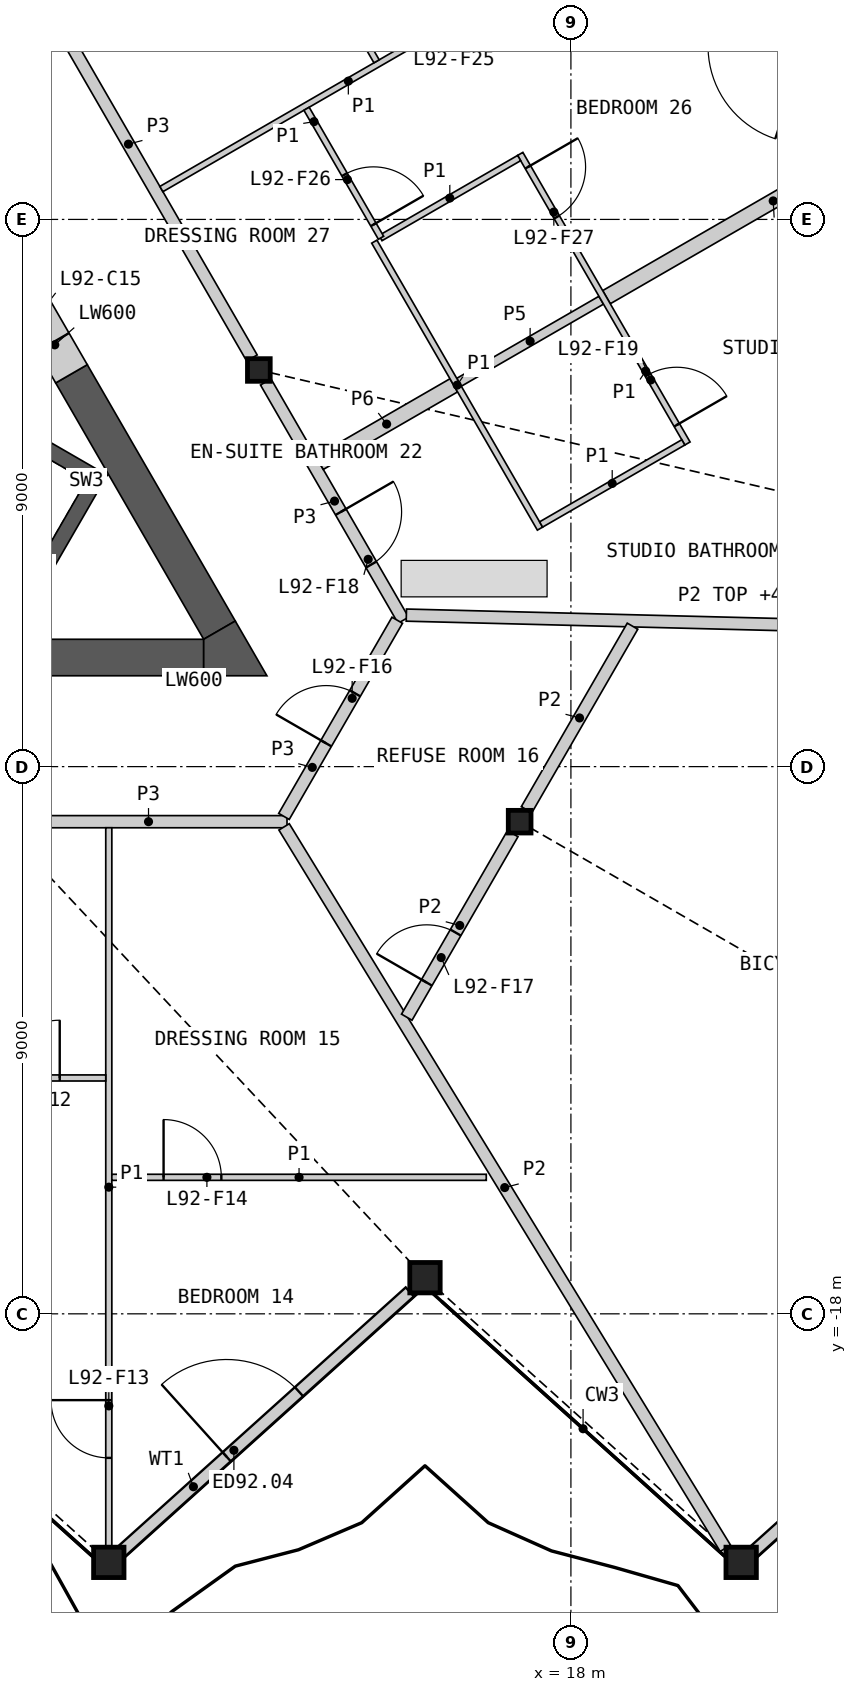
"""IFC4 building model, lengths in metres.
Left out: names, types, materials, properties, quantities, classifications, styles, units other than length and angle.
Written with IfcOpenShell. Run it as: python <this file> out.ifc"""

import sys

from ifc_helpers import new_model, si_unit, direction, frame, frame_2d, origin, origin_2d, place, context, subcontext, project, spatial, polyline, rectangle, hollow_rectangle, i_section, outline, extrude, element, fill, save


model = new_model("IFC4")
c1 = context("Model", 3, precision=1e-05, world=origin(), true_north=direction((0.0, 1.0)))
c2 = subcontext(c1, "Body", "Model", "MODEL_VIEW")
j1 = project(units=[si_unit("LENGTHUNIT", "METRE"), si_unit("PLANEANGLEUNIT", "RADIAN")], contexts=[c1])
p1 = place(None, origin())
s1 = spatial("IfcSite", under=j1, at=p1, CompositionType="ELEMENT")
p2 = place(p1, origin())
s2 = spatial("IfcBuilding", under=s1, at=p2, CompositionType="ELEMENT")
p3 = place(p2, frame((0.0, 0.0, 401.8)))
s3 = spatial("IfcBuildingStorey", under=s2, at=p3, CompositionType="ELEMENT", Elevation=401.8)
for number, where, z_axis, x_axis in (
    (1, (10.4, -22.088, 0.0), (0.0, 0.0, 1.0), (1.0, 0.0, 0.0)),
    (2, (15.6, -17.406, 0.0), (0.0, 0.0, 1.0), (1.0, 0.0, 0.0)),
    (3, (20.8, -22.088, 0.0), (0.0, 0.0, 1.0), (1.0, 0.0, 0.0)),
):
    element("IfcColumn", number, at=place(p3, frame(where, z_axis=z_axis, x_axis=x_axis)), inside=s3, PredefinedType="COLUMN", context=c2, shape_type="SweptSolid", body=[
        extrude(hollow_rectangle(XDim=0.5, YDim=0.5, WallThickness=0.03, at=origin_2d()), origin(), (0.0, 0.0, 1.0), 3.4),
    ])
for number, where, z_axis, x_axis in (
    (4, (17.157, -9.906, 0.0), (0.0, 0.0, 1.0), (1.0, 0.0, 0.0)),
    (5, (12.868, -2.476, 0.0), (0.0, 0.0, 1.0), (1.0, 0.0, 0.0)),
):
    element("IfcColumn", number, at=place(p3, frame(where, z_axis=z_axis, x_axis=x_axis)), inside=s3, PredefinedType="COLUMN", context=c2, shape_type="SweptSolid", body=[
        extrude(i_section(OverallWidth=0.374, OverallDepth=0.372, WebThickness=0.016, FlangeThickness=0.026, at=origin_2d()), origin(), (0.0, 0.0, 1.0), 3.4),
    ])
p4 = place(p3, frame((10.605, -21.912, 0.0), z_axis=(0.0, 0.0, 1.0), x_axis=(0.743149635876, 0.669125263831, 0.0)))
e6 = element("IfcWall", 6, at=p4, inside=s3, PredefinedType="SOLIDWALL", context=c2, shape_type="SweptSolid", body=[
    extrude(rectangle(XDim=6.385, YDim=0.2, at=frame_2d((3.193, 0.0))), origin(), (0.0, 0.0, 1.0), 2.634),
])
p5 = place(p4, frame((2.333, 0.0, 0.0)))
e7 = element("IfcOpeningElement", 7, at=p5, cuts=e6, PredefinedType="OPENING", context=c2, shape_type="SweptSolid", body=[
    extrude(rectangle(XDim=1.6, YDim=2.25, at=frame_2d((0.8, 1.125))), frame((0.0, 0.11, 0.0), z_axis=(0.0, -1.0, 0.0), x_axis=(1.0, 0.0, 0.0)), (0.0, 0.0, 1.0), 0.22),
])
p6 = place(p3, frame((21.005, -21.912, 0.0), z_axis=(0.0, 0.0, 1.0), x_axis=(0.743132515916, 0.669144277259, 0.0)))
e8 = element("IfcWall", 8, at=p6, inside=s3, PredefinedType="SOLIDWALL", context=c2, shape_type="SweptSolid", body=[
    extrude(rectangle(XDim=6.385, YDim=0.2, at=frame_2d((3.192, 0.0))), origin(), (0.0, 0.0, 1.0), 2.634),
])
p7 = place(p6, frame((2.333, 0.0, 0.0)))
e9 = element("IfcOpeningElement", 9, at=p7, cuts=e8, PredefinedType="OPENING", context=c2, shape_type="SweptSolid", body=[
    extrude(rectangle(XDim=1.6, YDim=2.25, at=frame_2d((0.8, 1.125))), frame((0.0, 0.11, 0.0), z_axis=(0.0, -1.0, 0.0), x_axis=(1.0, 0.0, 0.0)), (0.0, 0.0, 1.0), 0.22),
])
p8 = place(p3, frame((24.074, 2.127, 0.0), z_axis=(0.0, 0.0, 1.0), x_axis=(-0.951055516513, 0.309020071371, 0.0)))
e10 = element("IfcWall", 10, at=p8, inside=s3, PredefinedType="SOLIDWALL", context=c2, shape_type="SweptSolid", body=[
    extrude(rectangle(XDim=6.44, YDim=0.2, at=frame_2d((3.22, 0.0))), origin(), (0.0, 0.0, 1.0), 2.634),
])
p9 = place(p8, frame((2.333, 0.0, 0.0)))
e11 = element("IfcOpeningElement", 11, at=p9, cuts=e10, PredefinedType="OPENING", context=c2, shape_type="SweptSolid", body=[
    extrude(rectangle(XDim=1.6, YDim=2.25, at=frame_2d((0.8, 1.125))), frame((0.0, 0.11, 0.0), z_axis=(0.0, -1.0, 0.0), x_axis=(1.0, 0.0, 0.0)), (0.0, 0.0, 1.0), 0.22),
])
p10 = place(p3, origin())
e12 = element("IfcWall", 12, at=p10, inside=s3, PredefinedType="SHEAR", context=c2, shape_type="SweptSolid", body=[
    extrude(outline(polyline([(8.83, -6.881), (10.374, -4.206), (10.032, -4.298), (8.738, -6.539), (8.83, -6.881)])), origin(), (0.0, 0.0, 1.0), 3.1),
])
p11 = place(p3, origin())
e13 = element("IfcWall", 13, at=p11, inside=s3, PredefinedType="SHEAR", context=c2, shape_type="SweptSolid", body=[
    extrude(outline(polyline([(10.032, -4.298), (10.374, -4.206), (5.307, -1.281), (5.182, -1.498), (10.032, -4.298)])), origin(), (0.0, 0.0, 1.0), 3.1),
])
p12 = place(p3, frame((-4.892, -7.206, 0.0), z_axis=(0.0, 0.0, 1.0), x_axis=(1.0, 0.0, 0.0)))
e14 = element("IfcWall", 14, at=p12, inside=s3, PredefinedType="SHEAR", context=c2, shape_type="SweptSolid", body=[
    extrude(rectangle(XDim=16.853, YDim=0.6, at=frame_2d((8.426, 0.0))), origin(), (0.0, 0.0, 1.0), 3.1),
])
p13 = place(p3, frame((12.221, -6.756, 0.0), z_axis=(0.0, 0.0, 1.0), x_axis=(-0.50000604952, 0.866021911064, 0.0)))
e15 = element("IfcWall", 15, at=p13, inside=s3, PredefinedType="SHEAR", context=c2, shape_type="SweptSolid", body=[
    extrude(rectangle(XDim=4.869, YDim=0.6, at=frame_2d((2.434, 0.0))), origin(), (0.0, 0.0, 1.0), 3.1),
])
p14 = place(p3, origin())
e16 = element("IfcWall", 16, at=p14, inside=s3, PredefinedType="SHEAR", context=c2, shape_type="SweptSolid", body=[
    extrude(outline(polyline([(11.961, -7.506), (11.961, -6.906), (12.48, -6.606), (13.0, -7.506), (11.961, -7.506)])), origin(), (0.0, 0.0, 1.0), 3.1),
])
p15 = place(p3, frame((9.786, -2.539, 0.0), z_axis=(0.0, 0.0, 1.0), x_axis=(-0.499981787252, 0.866035918664, 0.0)))
e17 = element("IfcWall", 17, at=p15, inside=s3, PredefinedType="SHEAR", context=c2, shape_type="SweptSolid", body=[
    extrude(rectangle(XDim=2.2, YDim=0.6, at=frame_2d((1.1, 0.0))), origin(), (0.0, 0.0, 1.0), 3.1),
])
p16 = place(p15, frame((0.6, 0.0, 0.0)))
e18 = element("IfcOpeningElement", 18, at=p16, cuts=e17, PredefinedType="OPENING", context=c2, shape_type="SweptSolid", body=[
    extrude(rectangle(XDim=1.0, YDim=2.1, at=frame_2d((0.5, 1.05))), frame((0.0, 0.31, 0.0), z_axis=(0.0, -1.0, 0.0), x_axis=(1.0, 0.0, 0.0)), (0.0, 0.0, 1.0), 0.62),
])
p17 = place(p3, frame((8.692, 4.756, 0.0), z_axis=(0.0, 0.0, 1.0), x_axis=(0.500001682468, -0.866024432409, 0.0)))
e19 = element("IfcWall", 19, at=p17, inside=s3, PredefinedType="PARTITIONING", context=c2, shape_type="SweptSolid", body=[
    extrude(rectangle(XDim=8.124, YDim=0.2, at=frame_2d((4.062, 0.0))), origin(), (0.0, 0.0, 1.0), 3.1),
])
p18 = place(p3, frame((18.585, -1.279, 0.0), z_axis=(0.0, 0.0, 1.0), x_axis=(0.866023139795, 0.500003921324, 0.0)))
e20 = element("IfcWall", 20, at=p18, inside=s3, PredefinedType="PARTITIONING", context=c2, shape_type="SweptSolid", body=[
    extrude(rectangle(XDim=6.332, YDim=0.25, at=frame_2d((3.166, 0.0))), origin(), (0.0, 0.0, 1.0), 2.33),
])
p19 = place(p3, frame((8.775, -9.906, 0.0), z_axis=(0.0, 0.0, 1.0), x_axis=(1.0, 0.0, 0.0)))
e21 = element("IfcWall", 21, at=p19, inside=s3, PredefinedType="PARTITIONING", context=c2, shape_type="SweptSolid", body=[
    extrude(rectangle(XDim=4.555, YDim=0.2, at=frame_2d((2.278, 0.0))), origin(), (0.0, 0.0, 1.0), 3.1),
])
p20 = place(p3, frame((12.981, -2.673, 0.0), z_axis=(0.0, 0.0, 1.0), x_axis=(0.499974648164, -0.866040040179, 0.0)))
e22 = element("IfcWall", 22, at=p20, inside=s3, PredefinedType="PARTITIONING", context=c2, shape_type="SweptSolid", body=[
    extrude(rectangle(XDim=4.525, YDim=0.2, at=frame_2d((2.263, 0.0))), origin(), (0.0, 0.0, 1.0), 3.1),
])
p21 = place(p20, frame((2.468, 0.0, 0.0)))
e23 = element("IfcOpeningElement", 23, at=p21, cuts=e22, PredefinedType="OPENING", context=c2, shape_type="SweptSolid", body=[
    extrude(rectangle(XDim=1.0, YDim=2.1, at=frame_2d((0.5, 1.05))), frame((0.0, 0.11, 0.0), z_axis=(0.0, -1.0, 0.0), x_axis=(1.0, 0.0, 0.0)), (0.0, 0.0, 1.0), 0.22),
])
p22 = place(p3, frame((13.281, -9.819, 0.0), z_axis=(0.0, 0.0, 1.0), x_axis=(0.499958791762, 0.866049194065, 0.0)))
e24 = element("IfcWall", 24, at=p22, inside=s3, PredefinedType="PARTITIONING", context=c2, shape_type="SweptSolid", body=[
    extrude(rectangle(XDim=3.726, YDim=0.2, at=frame_2d((1.863, 0.0))), origin(), (0.0, 0.0, 1.0), 3.1),
])
p23 = place(p22, frame((1.388, 0.0, 0.0)))
e25 = element("IfcOpeningElement", 25, at=p23, cuts=e24, PredefinedType="OPENING", context=c2, shape_type="SweptSolid", body=[
    extrude(rectangle(XDim=0.95, YDim=2.1, at=frame_2d((0.475, 1.05))), frame((0.0, 0.11, 0.0), z_axis=(0.0, -1.0, 0.0), x_axis=(1.0, 0.0, 0.0)), (0.0, 0.0, 1.0), 0.22),
])
p24 = place(p3, frame((13.865, -4.004, 0.0), z_axis=(0.0, 0.0, 1.0), x_axis=(0.866054858364, 0.499948979701, 0.0)))
e26 = element("IfcWall", 26, at=p24, inside=s3, PredefinedType="PARTITIONING", context=c2, shape_type="SweptSolid", body=[
    extrude(rectangle(XDim=2.55, YDim=0.25, at=frame_2d((1.275, 0.0))), origin(), (0.0, 0.0, 1.0), 2.33),
])
p25 = place(p3, frame((15.294, -6.508, 0.0), z_axis=(0.0, 0.0, 1.0), x_axis=(0.999679467074, -0.02531724927, 0.0)))
e27 = element("IfcWall", 27, at=p25, inside=s3, PredefinedType="PARTITIONING", context=c2, shape_type="SweptSolid", body=[
    extrude(rectangle(XDim=13.53, YDim=0.2, at=frame_2d((6.765, 0.0))), origin(), (0.0, 0.0, 1.0), 2.33),
])
p26 = place(p3, frame((13.283, -9.991, 0.0), z_axis=(0.0, 0.0, 1.0), x_axis=(0.521777294246, -0.853081740052, 0.0)))
e28 = element("IfcWall", 28, at=p26, inside=s3, PredefinedType="PARTITIONING", context=c2, shape_type="SweptSolid", body=[
    extrude(rectangle(XDim=13.908, YDim=0.2, at=frame_2d((6.954, 0.0))), origin(), (0.0, 0.0, 1.0), 2.33),
])
p27 = place(p3, frame((15.301, -13.121, 0.0), z_axis=(0.0, 0.0, 1.0), x_axis=(0.499981154543, 0.866036283941, 0.0)))
e29 = element("IfcWall", 29, at=p27, inside=s3, PredefinedType="PARTITIONING", context=c2, shape_type="SweptSolid", body=[
    extrude(rectangle(XDim=3.486, YDim=0.2, at=frame_2d((1.743, 0.0))), origin(), (0.0, 0.0, 1.0), 2.33),
])
p28 = place(p27, frame((0.657, 0.0, 0.0)))
e30 = element("IfcOpeningElement", 30, at=p28, cuts=e29, PredefinedType="OPENING", context=c2, shape_type="SweptSolid", body=[
    extrude(rectangle(XDim=0.95, YDim=2.1, at=frame_2d((0.475, 1.05))), frame((0.0, 0.11, 0.0), z_axis=(0.0, -1.0, 0.0), x_axis=(1.0, 0.0, 0.0)), (0.0, 0.0, 1.0), 0.22),
])
p29 = place(p3, frame((17.271, -9.708, 0.0), z_axis=(0.0, 0.0, 1.0), x_axis=(0.500011485685, 0.866018772419, 0.0)))
e31 = element("IfcWall", 31, at=p29, inside=s3, PredefinedType="PARTITIONING", context=c2, shape_type="SweptSolid", body=[
    extrude(rectangle(XDim=3.485, YDim=0.2, at=frame_2d((1.743, 0.0))), origin(), (0.0, 0.0, 1.0), 2.33),
])
p30 = place(p3, frame((16.16, -2.679, 0.0), z_axis=(0.0, 0.0, 1.0), x_axis=(0.866019956843, 0.50000943426, 0.0)))
e32 = element("IfcWall", 32, at=p30, inside=s3, PredefinedType="PLUMBINGWALL", context=c2, shape_type="SweptSolid", body=[
    extrude(rectangle(XDim=2.7, YDim=0.15, at=frame_2d((1.35, 0.0))), origin(), (0.0, 0.0, 1.0), 2.33),
])
p31 = place(p3, frame((10.4, -21.828, 0.0), z_axis=(0.0, 0.0, 1.0), x_axis=(0.0, 1.0, 0.0)))
e33 = element("IfcWall", 33, at=p31, inside=s3, PredefinedType="PARTITIONING", context=c2, shape_type="SweptSolid", body=[
    extrude(rectangle(XDim=11.822, YDim=0.1, at=frame_2d((5.911, 0.0))), origin(), (0.0, 0.0, 1.0), 2.33),
])
p32 = place(p31, frame((1.458, 0.0, 0.0)))
e34 = element("IfcOpeningElement", 34, at=p32, cuts=e33, PredefinedType="OPENING", context=c2, shape_type="SweptSolid", body=[
    extrude(rectangle(XDim=0.95, YDim=2.1, at=frame_2d((0.475, 1.05))), frame((0.0, 0.06, 0.0), z_axis=(0.0, -1.0, 0.0), x_axis=(1.0, 0.0, 0.0)), (0.0, 0.0, 1.0), 0.12),
])
p33 = place(p3, frame((11.265, 0.5, 0.0), z_axis=(0.0, 0.0, 1.0), x_axis=(0.866033839264, 0.499985389037, 0.0)))
e35 = element("IfcWall", 35, at=p33, inside=s3, PredefinedType="PARTITIONING", context=c2, shape_type="SweptSolid", body=[
    extrude(rectangle(XDim=7.1, YDim=0.1, at=frame_2d((3.55, 0.0))), origin(), (0.0, 0.0, 1.0), 2.33),
])
p34 = place(p33, frame((4.992, 0.0, 0.0)))
e36 = element("IfcOpeningElement", 36, at=p34, cuts=e35, PredefinedType="OPENING", context=c2, shape_type="SweptSolid", body=[
    extrude(rectangle(XDim=0.95, YDim=2.1, at=frame_2d((0.475, 1.05))), frame((0.0, 0.06, 0.0), z_axis=(0.0, -1.0, 0.0), x_axis=(1.0, 0.0, 0.0)), (0.0, 0.0, 1.0), 0.12),
])
p35 = place(p3, frame((10.45, -15.755, 0.0), z_axis=(0.0, 0.0, 1.0), x_axis=(1.0, 0.0, 0.0)))
e37 = element("IfcWall", 37, at=p35, inside=s3, PredefinedType="PARTITIONING", context=c2, shape_type="SweptSolid", body=[
    extrude(rectangle(XDim=6.158, YDim=0.1, at=frame_2d((3.079, 0.0))), origin(), (0.0, 0.0, 1.0), 2.33),
])
p36 = place(p35, frame((0.851, 0.0, 0.0)))
e38 = element("IfcOpeningElement", 38, at=p36, cuts=e37, PredefinedType="OPENING", context=c2, shape_type="SweptSolid", body=[
    extrude(rectangle(XDim=0.95, YDim=2.1, at=frame_2d((0.475, 1.05))), frame((0.0, 0.06, 0.0), z_axis=(0.0, -1.0, 0.0), x_axis=(1.0, 0.0, 0.0)), (0.0, 0.0, 1.0), 0.12),
])
p37 = place(p3, frame((14.767, -0.365, 0.0), z_axis=(0.0, 0.0, 1.0), x_axis=(0.500002931134, -0.866023711487, 0.0)))
e39 = element("IfcWall", 39, at=p37, inside=s3, PredefinedType="PARTITIONING", context=c2, shape_type="SweptSolid", body=[
    extrude(rectangle(XDim=5.45, YDim=0.1, at=frame_2d((2.725, 0.0))), origin(), (0.0, 0.0, 1.0), 2.33),
])
p38 = place(p3, frame((17.167, 1.078, 0.0), z_axis=(0.0, 0.0, 1.0), x_axis=(0.499996545922, -0.866027397988, 0.0)))
e40 = element("IfcWall", 40, at=p38, inside=s3, PredefinedType="PARTITIONING", context=c2, shape_type="SweptSolid", body=[
    extrude(rectangle(XDim=5.5, YDim=0.1, at=frame_2d((2.75, 0.0))), origin(), (0.0, 0.0, 1.0), 2.33),
])
p39 = place(p38, frame((4.199, 0.0, 0.0)))
e41 = element("IfcOpeningElement", 41, at=p39, cuts=e40, PredefinedType="OPENING", context=c2, shape_type="SweptSolid", body=[
    extrude(rectangle(XDim=0.95, YDim=2.1, at=frame_2d((0.475, 1.05))), frame((0.0, 0.06, 0.0), z_axis=(0.0, -1.0, 0.0), x_axis=(1.0, 0.0, 0.0)), (0.0, 0.0, 1.0), 0.12),
])
p40 = place(p38, frame((0.25, 0.0, 0.0)))
e42 = element("IfcOpeningElement", 42, at=p40, cuts=e40, PredefinedType="OPENING", context=c2, shape_type="SweptSolid", body=[
    extrude(rectangle(XDim=0.95, YDim=2.1, at=frame_2d((0.475, 1.05))), frame((0.0, 0.06, 0.0), z_axis=(0.0, -1.0, 0.0), x_axis=(1.0, 0.0, 0.0)), (0.0, 0.0, 1.0), 0.12),
])
p41 = place(p3, frame((12.254, 7.017, 0.0), z_axis=(0.0, 0.0, 1.0), x_axis=(0.500005610874, -0.86602216432, 0.0)))
e43 = element("IfcWall", 43, at=p41, inside=s3, PredefinedType="PARTITIONING", context=c2, shape_type="SweptSolid", body=[
    extrude(rectangle(XDim=5.1, YDim=0.1, at=frame_2d((2.55, 0.0))), origin(), (0.0, 0.0, 1.0), 2.33),
])
p42 = place(p41, frame((2.379, 0.0, 0.0)))
e44 = element("IfcOpeningElement", 44, at=p42, cuts=e43, PredefinedType="OPENING", context=c2, shape_type="SweptSolid", body=[
    extrude(rectangle(XDim=0.95, YDim=2.1, at=frame_2d((0.475, 1.05))), frame((0.0, 0.06, 0.0), z_axis=(0.0, -1.0, 0.0), x_axis=(1.0, 0.0, 0.0)), (0.0, 0.0, 1.0), 0.12),
])
p43 = place(p3, frame((5.25, -14.121, 0.0), z_axis=(0.0, 0.0, 1.0), x_axis=(1.0, 0.0, 0.0)))
e45 = element("IfcWall", 45, at=p43, inside=s3, PredefinedType="PARTITIONING", context=c2, shape_type="SweptSolid", body=[
    extrude(rectangle(XDim=5.1, YDim=0.1, at=frame_2d((2.55, 0.0))), origin(), (0.0, 0.0, 1.0), 2.33),
])
p44 = place(p43, frame((3.393, 0.0, 0.0)))
e46 = element("IfcOpeningElement", 46, at=p44, cuts=e45, PredefinedType="OPENING", context=c2, shape_type="SweptSolid", body=[
    extrude(rectangle(XDim=0.95, YDim=2.1, at=frame_2d((0.475, 1.05))), frame((0.0, 0.06, 0.0), z_axis=(0.0, -1.0, 0.0), x_axis=(1.0, 0.0, 0.0)), (0.0, 0.0, 1.0), 0.12),
])
p45 = place(p3, frame((17.51, -5.017, 0.0), z_axis=(0.0, 0.0, 1.0), x_axis=(0.866059108428, 0.4999416173, 0.0)))
e47 = element("IfcWall", 47, at=p45, inside=s3, PredefinedType="PARTITIONING", context=c2, shape_type="SweptSolid", body=[
    extrude(rectangle(XDim=2.7, YDim=0.1, at=frame_2d((1.35, 0.0))), origin(), (0.0, 0.0, 1.0), 2.33),
])
p46 = place(p3, frame((14.868, -0.307, 0.0), z_axis=(0.0, 0.0, 1.0), x_axis=(0.865997164422, 0.50004890882, 0.0)))
e48 = element("IfcWall", 48, at=p46, inside=s3, PredefinedType="PARTITIONING", context=c2, shape_type="SweptSolid", body=[
    extrude(rectangle(XDim=2.633, YDim=0.1, at=frame_2d((1.316, 0.0))), origin(), (0.0, 0.0, 1.0), 2.33),
])
p47 = place(p3, frame((13.652, 1.82, 0.0), z_axis=(0.0, 0.0, 1.0), x_axis=(0.500018594424, -0.866014668023, 0.0)))
e49 = element("IfcWall", 49, at=p47, inside=s3, PredefinedType="PARTITIONING", context=c2, shape_type="SweptSolid", body=[
    extrude(rectangle(XDim=2.45, YDim=0.1, at=frame_2d((1.225, 0.0))), origin(), (0.0, 0.0, 1.0), 2.33),
])
p48 = place(p47, frame((1.25, 0.0, 0.0)))
e50 = element("IfcOpeningElement", 50, at=p48, cuts=e49, PredefinedType="OPENING", context=c2, shape_type="SweptSolid", body=[
    extrude(rectangle(XDim=0.95, YDim=2.1, at=frame_2d((0.475, 1.05))), frame((0.0, 0.06, 0.0), z_axis=(0.0, -1.0, 0.0), x_axis=(1.0, 0.0, 0.0)), (0.0, 0.0, 1.0), 0.12),
])
p49 = place(p5, origin())
e51 = element("IfcDoor", 51, at=p49, inside=s3, OperationType="DOUBLE_DOOR_SINGLE_SWING", PredefinedType="DOOR", context=c2, shape_type="SweptSolid", body=[
    extrude(rectangle(XDim=1.6, YDim=2.25, at=frame_2d((0.8, 1.125))), frame((0.0, 0.025, 0.0), z_axis=(0.0, -1.0, 0.0), x_axis=(1.0, 0.0, 0.0)), (0.0, 0.0, 1.0), 0.05),
])
fill(e7, e51)
p50 = place(p16, origin())
e52 = element("IfcDoor", 52, at=p50, inside=s3, OperationType="SINGLE_SWING_LEFT", PredefinedType="DOOR", context=c2, shape_type="SweptSolid", body=[
    extrude(rectangle(XDim=1.0, YDim=2.1, at=frame_2d((0.5, 1.05))), frame((0.0, 0.055, 0.0), z_axis=(0.0, -1.0, 0.0), x_axis=(1.0, 0.0, 0.0)), (0.0, 0.0, 1.0), 0.05),
])
fill(e18, e52)
p51 = place(p44, origin())
e53 = element("IfcDoor", 53, at=p51, inside=s3, OperationType="SINGLE_SWING_RIGHT", PredefinedType="DOOR", context=c2, shape_type="SweptSolid", body=[
    extrude(rectangle(XDim=0.95, YDim=2.1, at=frame_2d((0.475, 1.05))), frame((0.0, 0.025, 0.0), z_axis=(0.0, -1.0, 0.0), x_axis=(1.0, 0.0, 0.0)), (0.0, 0.0, 1.0), 0.05),
])
fill(e46, e53)
p52 = place(p32, origin())
e54 = element("IfcDoor", 54, at=p52, inside=s3, OperationType="SINGLE_SWING_RIGHT", PredefinedType="DOOR", context=c2, shape_type="SweptSolid", body=[
    extrude(rectangle(XDim=0.95, YDim=2.1, at=frame_2d((0.475, 1.05))), frame((0.0, 0.025, 0.0), z_axis=(0.0, -1.0, 0.0), x_axis=(1.0, 0.0, 0.0)), (0.0, 0.0, 1.0), 0.05),
])
fill(e34, e54)
p53 = place(p36, origin())
e55 = element("IfcDoor", 55, at=p53, inside=s3, OperationType="SINGLE_SWING_LEFT", PredefinedType="DOOR", context=c2, shape_type="SweptSolid", body=[
    extrude(rectangle(XDim=0.95, YDim=2.1, at=frame_2d((0.475, 1.05))), frame((0.0, 0.025, 0.0), z_axis=(0.0, -1.0, 0.0), x_axis=(1.0, 0.0, 0.0)), (0.0, 0.0, 1.0), 0.05),
])
fill(e38, e55)
p54 = place(p23, origin())
e56 = element("IfcDoor", 56, at=p54, inside=s3, OperationType="SINGLE_SWING_LEFT", PredefinedType="DOOR", context=c2, shape_type="SweptSolid", body=[
    extrude(rectangle(XDim=0.95, YDim=2.1, at=frame_2d((0.475, 1.05))), frame((0.0, 0.025, 0.0), z_axis=(0.0, -1.0, 0.0), x_axis=(1.0, 0.0, 0.0)), (0.0, 0.0, 1.0), 0.05),
])
fill(e25, e56)
p55 = place(p28, origin())
e57 = element("IfcDoor", 57, at=p55, inside=s3, OperationType="SINGLE_SWING_LEFT", PredefinedType="DOOR", context=c2, shape_type="SweptSolid", body=[
    extrude(rectangle(XDim=0.95, YDim=2.1, at=frame_2d((0.475, 1.05))), frame((0.0, 0.025, 0.0), z_axis=(0.0, -1.0, 0.0), x_axis=(1.0, 0.0, 0.0)), (0.0, 0.0, 1.0), 0.05),
])
fill(e30, e57)
p56 = place(p21, origin())
e58 = element("IfcDoor", 58, at=p56, inside=s3, OperationType="SINGLE_SWING_LEFT", PredefinedType="DOOR", context=c2, shape_type="SweptSolid", body=[
    extrude(rectangle(XDim=1.0, YDim=2.1, at=frame_2d((0.5, 1.05))), frame((0.0, 0.025, 0.0), z_axis=(0.0, -1.0, 0.0), x_axis=(1.0, 0.0, 0.0)), (0.0, 0.0, 1.0), 0.05),
])
fill(e23, e58)
p57 = place(p39, origin())
e59 = element("IfcDoor", 59, at=p57, inside=s3, OperationType="SINGLE_SWING_RIGHT", PredefinedType="DOOR", context=c2, shape_type="SweptSolid", body=[
    extrude(rectangle(XDim=0.95, YDim=2.1, at=frame_2d((0.475, 1.05))), frame((0.0, 0.025, 0.0), z_axis=(0.0, -1.0, 0.0), x_axis=(1.0, 0.0, 0.0)), (0.0, 0.0, 1.0), 0.05),
])
fill(e41, e59)
p58 = place(p48, origin())
e60 = element("IfcDoor", 60, at=p58, inside=s3, OperationType="SINGLE_SWING_RIGHT", PredefinedType="DOOR", context=c2, shape_type="SweptSolid", body=[
    extrude(rectangle(XDim=0.95, YDim=2.1, at=frame_2d((0.475, 1.05))), frame((0.0, 0.025, 0.0), z_axis=(0.0, -1.0, 0.0), x_axis=(1.0, 0.0, 0.0)), (0.0, 0.0, 1.0), 0.05),
])
fill(e50, e60)
p59 = place(p40, origin())
e61 = element("IfcDoor", 61, at=p59, inside=s3, OperationType="SINGLE_SWING_LEFT", PredefinedType="DOOR", context=c2, shape_type="SweptSolid", body=[
    extrude(rectangle(XDim=0.95, YDim=2.1, at=frame_2d((0.475, 1.05))), frame((0.0, 0.025, 0.0), z_axis=(0.0, -1.0, 0.0), x_axis=(1.0, 0.0, 0.0)), (0.0, 0.0, 1.0), 0.05),
])
fill(e42, e61)
save(model, sys.argv[1])
